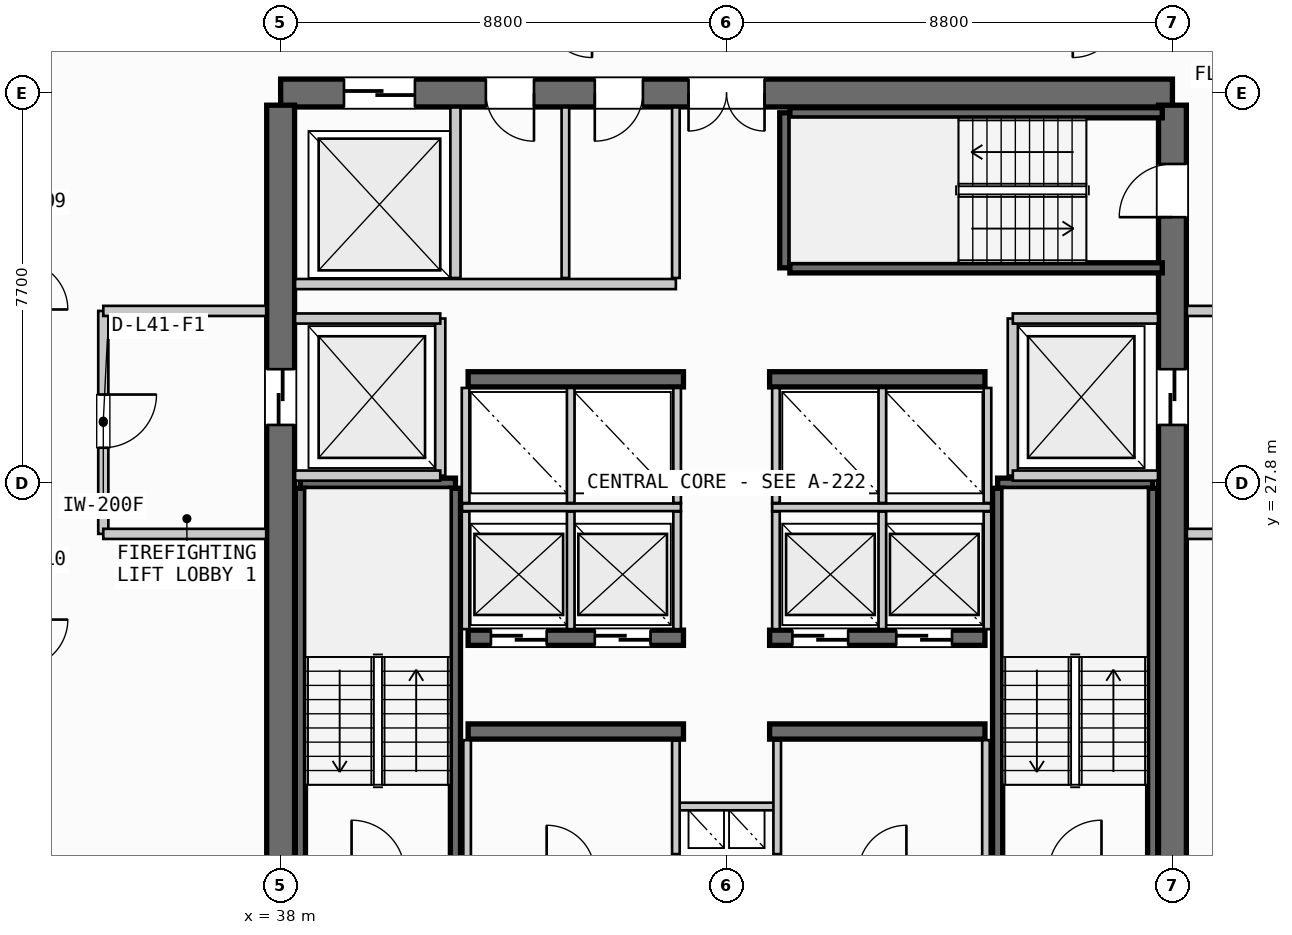
"""IFC4 building model, lengths in metres.
Left out: names, types, materials, properties, quantities, classifications, styles, units other than length and angle.
Written with IfcOpenShell. Run it as: python <this file> out.ifc"""

import sys

from ifc_helpers import new_model, si_unit, direction, frame, frame_2d, origin, place, context, subcontext, project, spatial, rectangle, extrude, source, transform, mapped, element, fill, save


model = new_model("IFC4")
c1 = context("Model", 3, precision=1e-05, world=origin(), true_north=direction((0.0, 1.0)))
c2 = subcontext(c1, "Body", "Model", "MODEL_VIEW")
j1 = project(units=[si_unit("LENGTHUNIT", "METRE"), si_unit("PLANEANGLEUNIT", "RADIAN")], contexts=[c1])
p1 = place(None, origin())
s1 = spatial("IfcSite", under=j1, at=p1, CompositionType="ELEMENT")
p2 = place(p1, origin())
s2 = spatial("IfcBuilding", under=s1, at=p2, CompositionType="ELEMENT")
p3 = place(p2, frame((0.0, 0.0, 160.75)))
s3 = spatial("IfcBuildingStorey", under=s2, at=p3, CompositionType="ELEMENT", Elevation=160.75)
p4 = place(p3, frame((55.6, 35.5, 0.0), z_axis=(0.0, 0.0, 1.0), x_axis=(-1.0, 0.0, 0.0)))
e1 = element("IfcWall", 1, at=p4, inside=s3, PredefinedType="SHEAR", context=c2, shape_type="SweptSolid", body=[
    extrude(rectangle(XDim=17.6, YDim=0.55, at=frame_2d((8.8, 0.0))), origin(), (0.0, 0.0, 1.0), 3.3),
])
p5 = place(p4, frame((8.05, 0.0, 0.0)))
e2 = element("IfcOpeningElement", 2, at=p5, cuts=e1, PredefinedType="OPENING", context=c2, shape_type="SweptSolid", body=[
    extrude(rectangle(XDim=1.5, YDim=2.2, at=frame_2d((0.75, 1.1))), frame((0.0, 0.285, 0.0), z_axis=(0.0, -1.0, 0.0), x_axis=(1.0, 0.0, 0.0)), (0.0, 0.0, 1.0), 0.57),
])
p6 = place(p4, frame((14.95, 0.0, 0.0)))
e3 = element("IfcOpeningElement", 3, at=p6, cuts=e1, PredefinedType="OPENING", context=c2, shape_type="SweptSolid", body=[
    extrude(rectangle(XDim=1.4, YDim=2.3, at=frame_2d((0.7, 1.15))), frame((0.0, 0.285, 0.0), z_axis=(0.0, -1.0, 0.0), x_axis=(1.0, 0.0, 0.0)), (0.0, 0.0, 1.0), 0.57),
])
p7 = place(p4, frame((12.6, 0.0, 0.0)))
e4 = element("IfcOpeningElement", 4, at=p7, cuts=e1, PredefinedType="OPENING", context=c2, shape_type="SweptSolid", body=[
    extrude(rectangle(XDim=0.95, YDim=2.15, at=frame_2d((0.475, 1.075))), frame((0.0, 0.285, 0.0), z_axis=(0.0, -1.0, 0.0), x_axis=(1.0, 0.0, 0.0)), (0.0, 0.0, 1.0), 0.57),
])
p8 = place(p4, frame((10.45, 0.0, 0.0)))
e5 = element("IfcOpeningElement", 5, at=p8, cuts=e1, PredefinedType="OPENING", context=c2, shape_type="SweptSolid", body=[
    extrude(rectangle(XDim=0.95, YDim=2.15, at=frame_2d((0.475, 1.075))), frame((0.0, 0.285, 0.0), z_axis=(0.0, -1.0, 0.0), x_axis=(1.0, 0.0, 0.0)), (0.0, 0.0, 1.0), 0.57),
])
p9 = place(p3, frame((38.0, 35.26, 0.0), z_axis=(0.0, 0.0, 1.0), x_axis=(0.0, -1.0, 0.0)))
e6 = element("IfcWall", 6, at=p9, inside=s3, PredefinedType="SHEAR", context=c2, shape_type="SweptSolid", body=[
    extrude(rectangle(XDim=14.92, YDim=0.55, at=frame_2d((7.46, 0.0))), origin(), (0.0, 0.0, 1.0), 3.3),
])
p10 = place(p9, frame((5.21, 0.0, 0.0)))
e7 = element("IfcOpeningElement", 7, at=p10, cuts=e6, PredefinedType="OPENING", context=c2, shape_type="SweptSolid", body=[
    extrude(rectangle(XDim=1.1, YDim=2.2, at=frame_2d((0.55, 1.1))), frame((0.0, 0.285, 0.0), z_axis=(0.0, -1.0, 0.0), x_axis=(1.0, 0.0, 0.0)), (0.0, 0.0, 1.0), 0.57),
])
p11 = place(p3, frame((55.6, 20.34, 0.0), z_axis=(0.0, 0.0, 1.0), x_axis=(0.0, 1.0, 0.0)))
e8 = element("IfcWall", 8, at=p11, inside=s3, PredefinedType="SHEAR", context=c2, shape_type="SweptSolid", body=[
    extrude(rectangle(XDim=14.92, YDim=0.55, at=frame_2d((7.46, 0.0))), origin(), (0.0, 0.0, 1.0), 3.3),
])
p12 = place(p11, frame((12.71, 0.0, 0.0)))
e9 = element("IfcOpeningElement", 9, at=p12, cuts=e8, PredefinedType="OPENING", context=c2, shape_type="SweptSolid", body=[
    extrude(rectangle(XDim=1.05, YDim=2.15, at=frame_2d((0.525, 1.075))), frame((0.0, 0.285, 0.0), z_axis=(0.0, -1.0, 0.0), x_axis=(1.0, 0.0, 0.0)), (0.0, 0.0, 1.0), 0.57),
])
p13 = place(p11, frame((8.61, 0.0, 0.0)))
e10 = element("IfcOpeningElement", 10, at=p13, cuts=e8, PredefinedType="OPENING", context=c2, shape_type="SweptSolid", body=[
    extrude(rectangle(XDim=1.1, YDim=2.2, at=frame_2d((0.55, 1.1))), frame((0.0, 0.285, 0.0), z_axis=(0.0, -1.0, 0.0), x_axis=(1.0, 0.0, 0.0)), (0.0, 0.0, 1.0), 0.57),
])
for number, where, z_axis, x_axis in (
    (11, (41.7, 22.9, 0.0), (0.0, 0.0, 1.0), (1.0, 0.0, 0.0)),
    (12, (47.65, 22.9, 0.0), (0.0, 0.0, 1.0), (1.0, 0.0, 0.0)),
):
    element("IfcWall", number, at=place(p3, frame(where, z_axis=z_axis, x_axis=x_axis)), inside=s3, PredefinedType="SHEAR", context=c2, shape_type="SweptSolid", body=[
        extrude(rectangle(XDim=4.25, YDim=0.3, at=frame_2d((2.125, 0.0))), origin(), (0.0, 0.0, 1.0), 3.3),
    ])
p14 = place(p3, frame((41.7, 24.75, 0.0), z_axis=(0.0, 0.0, 1.0), x_axis=(1.0, 0.0, 0.0)))
e13 = element("IfcWall", 13, at=p14, inside=s3, PredefinedType="SHEAR", context=c2, shape_type="SweptSolid", body=[
    extrude(rectangle(XDim=4.25, YDim=0.3, at=frame_2d((2.125, 0.0))), origin(), (0.0, 0.0, 1.0), 3.3),
])
p15 = place(p14, frame((0.45, 0.0, 0.0)))
e14 = element("IfcOpeningElement", 14, at=p15, cuts=e13, PredefinedType="OPENING", context=c2, shape_type="SweptSolid", body=[
    extrude(rectangle(XDim=1.1, YDim=2.2, at=frame_2d((0.55, 1.1))), frame((0.0, 0.16, 0.0), z_axis=(0.0, -1.0, 0.0), x_axis=(1.0, 0.0, 0.0)), (0.0, 0.0, 1.0), 0.32),
])
p16 = place(p14, frame((2.5, 0.0, 0.0)))
e15 = element("IfcOpeningElement", 15, at=p16, cuts=e13, PredefinedType="OPENING", context=c2, shape_type="SweptSolid", body=[
    extrude(rectangle(XDim=1.1, YDim=2.2, at=frame_2d((0.55, 1.1))), frame((0.0, 0.16, 0.0), z_axis=(0.0, -1.0, 0.0), x_axis=(1.0, 0.0, 0.0)), (0.0, 0.0, 1.0), 0.32),
])
p17 = place(p3, frame((47.65, 24.75, 0.0), z_axis=(0.0, 0.0, 1.0), x_axis=(1.0, 0.0, 0.0)))
e16 = element("IfcWall", 16, at=p17, inside=s3, PredefinedType="SHEAR", context=c2, shape_type="SweptSolid", body=[
    extrude(rectangle(XDim=4.25, YDim=0.3, at=frame_2d((2.125, 0.0))), origin(), (0.0, 0.0, 1.0), 3.3),
])
p18 = place(p17, frame((0.45, 0.0, 0.0)))
e17 = element("IfcOpeningElement", 17, at=p18, cuts=e16, PredefinedType="OPENING", context=c2, shape_type="SweptSolid", body=[
    extrude(rectangle(XDim=1.1, YDim=2.2, at=frame_2d((0.55, 1.1))), frame((0.0, 0.16, 0.0), z_axis=(0.0, -1.0, 0.0), x_axis=(1.0, 0.0, 0.0)), (0.0, 0.0, 1.0), 0.32),
])
p19 = place(p17, frame((2.5, 0.0, 0.0)))
e18 = element("IfcOpeningElement", 18, at=p19, cuts=e16, PredefinedType="OPENING", context=c2, shape_type="SweptSolid", body=[
    extrude(rectangle(XDim=1.1, YDim=2.2, at=frame_2d((0.55, 1.1))), frame((0.0, 0.16, 0.0), z_axis=(0.0, -1.0, 0.0), x_axis=(1.0, 0.0, 0.0)), (0.0, 0.0, 1.0), 0.32),
])
for number, where, z_axis, x_axis in (
    (19, (41.7, 29.85, 0.0), (0.0, 0.0, 1.0), (1.0, 0.0, 0.0)),
    (20, (47.65, 29.85, 0.0), (0.0, 0.0, 1.0), (1.0, 0.0, 0.0)),
):
    element("IfcWall", number, at=place(p3, frame(where, z_axis=z_axis, x_axis=x_axis)), inside=s3, PredefinedType="SHEAR", context=c2, shape_type="SweptSolid", body=[
        extrude(rectangle(XDim=4.25, YDim=0.3, at=frame_2d((2.125, 0.0))), origin(), (0.0, 0.0, 1.0), 3.3),
    ])
p20 = place(p3, frame((38.39, 27.8, 0.0), z_axis=(0.0, 0.0, 1.0), x_axis=(1.0, 0.0, 0.0)))
e21 = element("IfcWall", 21, at=p20, inside=s3, PredefinedType="SHEAR", context=c2, shape_type="SweptSolid", body=[
    extrude(rectangle(XDim=3.06, YDim=0.2, at=frame_2d((1.53, 0.0))), origin(), (0.0, 0.0, 1.0), 3.3),
])
for number, where, z_axis, x_axis in (
    (22, (41.45, 27.7, 0.0), (0.0, 0.0, 1.0), (0.0, -1.0, 0.0)),
    (23, (38.39, 20.35, 0.0), (0.0, 0.0, 1.0), (0.0, 1.0, 0.0)),
):
    element("IfcWall", number, at=place(p3, frame(where, z_axis=z_axis, x_axis=x_axis)), inside=s3, PredefinedType="SHEAR", context=c2, shape_type="SweptSolid", body=[
        extrude(rectangle(XDim=7.35, YDim=0.2, at=frame_2d((3.675, 0.0))), origin(), (0.0, 0.0, 1.0), 3.3),
    ])
p21 = place(p3, frame((52.15, 27.8, 0.0), z_axis=(0.0, 0.0, 1.0), x_axis=(1.0, 0.0, 0.0)))
e24 = element("IfcWall", 24, at=p21, inside=s3, PredefinedType="SHEAR", context=c2, shape_type="SweptSolid", body=[
    extrude(rectangle(XDim=3.06, YDim=0.2, at=frame_2d((1.53, 0.0))), origin(), (0.0, 0.0, 1.0), 3.3),
])
for number, where, z_axis, x_axis in (
    (25, (55.21, 27.7, 0.0), (0.0, 0.0, 1.0), (0.0, -1.0, 0.0)),
    (26, (52.15, 20.35, 0.0), (0.0, 0.0, 1.0), (0.0, 1.0, 0.0)),
):
    element("IfcWall", number, at=place(p3, frame(where, z_axis=z_axis, x_axis=x_axis)), inside=s3, PredefinedType="SHEAR", context=c2, shape_type="SweptSolid", body=[
        extrude(rectangle(XDim=7.35, YDim=0.2, at=frame_2d((3.675, 0.0))), origin(), (0.0, 0.0, 1.0), 3.3),
    ])
p22 = place(p3, frame((47.95, 32.05, 0.0), z_axis=(0.0, 0.0, 1.0), x_axis=(0.0, 1.0, 0.0)))
e27 = element("IfcWall", 27, at=p22, inside=s3, PredefinedType="SHEAR", context=c2, shape_type="SweptSolid", body=[
    extrude(rectangle(XDim=3.06, YDim=0.2, at=frame_2d((1.53, 0.0))), origin(), (0.0, 0.0, 1.0), 3.3),
])
for number, where, z_axis, x_axis in (
    (28, (48.05, 35.11, 0.0), (0.0, 0.0, 1.0), (1.0, 0.0, 0.0)),
    (29, (55.4, 32.05, 0.0), (0.0, 0.0, 1.0), (-1.0, 0.0, 0.0)),
):
    element("IfcWall", number, at=place(p3, frame(where, z_axis=z_axis, x_axis=x_axis)), inside=s3, PredefinedType="SHEAR", context=c2, shape_type="SweptSolid", body=[
        extrude(rectangle(XDim=7.35, YDim=0.2, at=frame_2d((3.675, 0.0))), origin(), (0.0, 0.0, 1.0), 3.3),
    ])
p23 = place(p3, frame((45.8, 21.42, 0.0), z_axis=(0.0, 0.0, 1.0), x_axis=(1.0, 0.0, 0.0)))
e30 = element("IfcWall", 30, at=p23, inside=s3, PredefinedType="PARTITIONING", context=c2, shape_type="SweptSolid", body=[
    extrude(rectangle(XDim=2.0, YDim=0.15, at=frame_2d((1.0, 0.0))), origin(), (0.0, 0.0, 1.0), 2.28),
])
for number, where, z_axis, x_axis in (
    (31, (45.8, 20.48, 0.0), (0.0, 0.0, 1.0), (0.0, 1.0, 0.0)),
    (32, (47.8, 20.48, 0.0), (0.0, 0.0, 1.0), (0.0, 1.0, 0.0)),
):
    element("IfcWall", number, at=place(p3, frame(where, z_axis=z_axis, x_axis=x_axis)), inside=s3, PredefinedType="PARTITIONING", context=c2, shape_type="SweptSolid", body=[
        extrude(rectangle(XDim=2.24, YDim=0.15, at=frame_2d((1.12, 0.0))), origin(), (0.0, 0.0, 1.0), 2.28),
    ])
p24 = place(p3, frame((41.15, 27.95, 0.0), z_axis=(0.0, 0.0, 1.0), x_axis=(0.0, 1.0, 0.0)))
e33 = element("IfcWall", 33, at=p24, inside=s3, PredefinedType="PARTITIONING", context=c2, shape_type="SweptSolid", body=[
    extrude(rectangle(XDim=3.1, YDim=0.2, at=frame_2d((1.55, 0.0))), origin(), (0.0, 0.0, 1.0), 2.28),
])
for number, where, z_axis, x_axis in (
    (34, (38.285, 27.95, 0.0), (0.0, 0.0, 1.0), (1.0, 0.0, 0.0)),
    (35, (38.285, 31.05, 0.0), (0.0, 0.0, 1.0), (1.0, 0.0, 0.0)),
):
    element("IfcWall", number, at=place(p3, frame(where, z_axis=z_axis, x_axis=x_axis)), inside=s3, PredefinedType="PARTITIONING", context=c2, shape_type="SweptSolid", body=[
        extrude(rectangle(XDim=2.865, YDim=0.2, at=frame_2d((1.433, 0.0))), origin(), (0.0, 0.0, 1.0), 2.28),
    ])
p25 = place(p3, frame((34.5, 31.2, 0.0), z_axis=(0.0, 0.0, 1.0), x_axis=(0.0, -1.0, 0.0)))
e36 = element("IfcWall", 36, at=p25, inside=s3, PredefinedType="PARTITIONING", context=c2, shape_type="SweptSolid", body=[
    extrude(rectangle(XDim=4.4, YDim=0.2, at=frame_2d((2.2, 0.0))), origin(), (0.0, 0.0, 1.0), 2.28),
])
p26 = place(p25, frame((1.65, 0.0, 0.0)))
e37 = element("IfcOpeningElement", 37, at=p26, cuts=e36, PredefinedType="OPENING", context=c2, shape_type="SweptSolid", body=[
    extrude(rectangle(XDim=1.05, YDim=2.15, at=frame_2d((0.525, 1.075))), frame((0.0, 0.11, 0.0), z_axis=(0.0, -1.0, 0.0), x_axis=(1.0, 0.0, 0.0)), (0.0, 0.0, 1.0), 0.22),
])
for number, where, z_axis, x_axis in (
    (38, (34.5, 26.8, 0.0), (0.0, 0.0, 1.0), (1.0, 0.0, 0.0)),
    (39, (34.5, 31.2, 0.0), (0.0, 0.0, 1.0), (1.0, 0.0, 0.0)),
):
    element("IfcWall", number, at=place(p3, frame(where, z_axis=z_axis, x_axis=x_axis)), inside=s3, PredefinedType="PARTITIONING", context=c2, shape_type="SweptSolid", body=[
        extrude(rectangle(XDim=3.215, YDim=0.2, at=frame_2d((1.607, 0.0))), origin(), (0.0, 0.0, 1.0), 2.28),
    ])
p27 = place(p3, frame((52.45, 27.95, 0.0), z_axis=(0.0, 0.0, 1.0), x_axis=(0.0, 1.0, 0.0)))
e40 = element("IfcWall", 40, at=p27, inside=s3, PredefinedType="PARTITIONING", context=c2, shape_type="SweptSolid", body=[
    extrude(rectangle(XDim=3.1, YDim=0.2, at=frame_2d((1.55, 0.0))), origin(), (0.0, 0.0, 1.0), 2.28),
])
for number, where, z_axis, x_axis in (
    (41, (52.45, 27.95, 0.0), (0.0, 0.0, 1.0), (1.0, 0.0, 0.0)),
    (42, (52.45, 31.05, 0.0), (0.0, 0.0, 1.0), (1.0, 0.0, 0.0)),
):
    element("IfcWall", number, at=place(p3, frame(where, z_axis=z_axis, x_axis=x_axis)), inside=s3, PredefinedType="PARTITIONING", context=c2, shape_type="SweptSolid", body=[
        extrude(rectangle(XDim=2.865, YDim=0.2, at=frame_2d((1.433, 0.0))), origin(), (0.0, 0.0, 1.0), 2.28),
    ])
for number, where, z_axis, x_axis in (
    (43, (55.885, 26.8, 0.0), (0.0, 0.0, 1.0), (1.0, 0.0, 0.0)),
    (44, (55.885, 31.2, 0.0), (0.0, 0.0, 1.0), (1.0, 0.0, 0.0)),
):
    element("IfcWall", number, at=place(p3, frame(where, z_axis=z_axis, x_axis=x_axis)), inside=s3, PredefinedType="PARTITIONING", context=c2, shape_type="SweptSolid", body=[
        extrude(rectangle(XDim=3.215, YDim=0.2, at=frame_2d((1.607, 0.0))), origin(), (0.0, 0.0, 1.0), 2.28),
    ])
for number, where, z_axis, x_axis in (
    (45, (41.68, 20.385, 0.0), (0.0, 0.0, 1.0), (0.0, 1.0, 0.0)),
    (46, (51.92, 20.385, 0.0), (0.0, 0.0, 1.0), (0.0, 1.0, 0.0)),
):
    element("IfcWall", number, at=place(p3, frame(where, z_axis=z_axis, x_axis=x_axis)), inside=s3, PredefinedType="PARTITIONING", context=c2, shape_type="SweptSolid", body=[
        extrude(rectangle(XDim=2.345, YDim=0.15, at=frame_2d((1.172, 0.0))), origin(), (0.0, 0.0, 1.0), 2.28),
    ])
p28 = place(p3, frame((41.58, 27.325, 0.0), z_axis=(0.0, 0.0, 1.0), x_axis=(1.0, 0.0, 0.0)))
e47 = element("IfcWall", 47, at=p28, inside=s3, PredefinedType="PARTITIONING", context=c2, shape_type="SweptSolid", body=[
    extrude(rectangle(XDim=4.32, YDim=0.15, at=frame_2d((2.16, 0.0))), origin(), (0.0, 0.0, 1.0), 2.28),
])
p29 = place(p3, frame((47.7, 27.325, 0.0), z_axis=(0.0, 0.0, 1.0), x_axis=(1.0, 0.0, 0.0)))
e48 = element("IfcWall", 48, at=p29, inside=s3, PredefinedType="PARTITIONING", context=c2, shape_type="SweptSolid", body=[
    extrude(rectangle(XDim=4.32, YDim=0.15, at=frame_2d((2.16, 0.0))), origin(), (0.0, 0.0, 1.0), 2.28),
])
for number, where, z_axis, x_axis in (
    (49, (41.65, 24.92, 0.0), (0.0, 0.0, 1.0), (0.0, 1.0, 0.0)),
    (50, (43.725, 24.92, 0.0), (0.0, 0.0, 1.0), (0.0, 1.0, 0.0)),
    (51, (45.825, 24.92, 0.0), (0.0, 0.0, 1.0), (0.0, 1.0, 0.0)),
    (52, (47.775, 24.92, 0.0), (0.0, 0.0, 1.0), (0.0, 1.0, 0.0)),
    (53, (49.875, 24.92, 0.0), (0.0, 0.0, 1.0), (0.0, 1.0, 0.0)),
    (54, (51.95, 24.92, 0.0), (0.0, 0.0, 1.0), (0.0, 1.0, 0.0)),
):
    element("IfcWall", number, at=place(p3, frame(where, z_axis=z_axis, x_axis=x_axis)), inside=s3, PredefinedType="PARTITIONING", context=c2, shape_type="SweptSolid", body=[
        extrude(rectangle(XDim=2.32, YDim=0.15, at=frame_2d((1.16, 0.0))), origin(), (0.0, 0.0, 1.0), 2.28),
    ])
for number, where, z_axis, x_axis in (
    (55, (41.65, 27.41, 0.0), (0.0, 0.0, 1.0), (0.0, 1.0, 0.0)),
    (56, (43.725, 27.41, 0.0), (0.0, 0.0, 1.0), (0.0, 1.0, 0.0)),
    (57, (45.825, 27.41, 0.0), (0.0, 0.0, 1.0), (0.0, 1.0, 0.0)),
    (58, (47.775, 27.41, 0.0), (0.0, 0.0, 1.0), (0.0, 1.0, 0.0)),
    (59, (49.875, 27.41, 0.0), (0.0, 0.0, 1.0), (0.0, 1.0, 0.0)),
    (60, (51.95, 27.41, 0.0), (0.0, 0.0, 1.0), (0.0, 1.0, 0.0)),
):
    element("IfcWall", number, at=place(p3, frame(where, z_axis=z_axis, x_axis=x_axis)), inside=s3, PredefinedType="PARTITIONING", context=c2, shape_type="SweptSolid", body=[
        extrude(rectangle(XDim=2.27, YDim=0.15, at=frame_2d((1.135, 0.0))), origin(), (0.0, 0.0, 1.0), 2.28),
    ])
p30 = place(p3, frame((41.45, 31.85, 0.0), z_axis=(0.0, 0.0, 1.0), x_axis=(0.0, 1.0, 0.0)))
e61 = element("IfcWall", 61, at=p30, inside=s3, PredefinedType="PARTITIONING", context=c2, shape_type="SweptSolid", body=[
    extrude(rectangle(XDim=3.365, YDim=0.2, at=frame_2d((1.683, 0.0))), origin(), (0.0, 0.0, 1.0), 2.28),
])
p31 = place(p3, frame((38.285, 31.73, 0.0), z_axis=(0.0, 0.0, 1.0), x_axis=(1.0, 0.0, 0.0)))
e62 = element("IfcWall", 62, at=p31, inside=s3, PredefinedType="PARTITIONING", context=c2, shape_type="SweptSolid", body=[
    extrude(rectangle(XDim=7.515, YDim=0.2, at=frame_2d((3.758, 0.0))), origin(), (0.0, 0.0, 1.0), 2.28),
])
p32 = place(p3, frame((45.8, 31.85, 0.0), z_axis=(0.0, 0.0, 1.0), x_axis=(0.0, 1.0, 0.0)))
e63 = element("IfcWall", 63, at=p32, inside=s3, PredefinedType="PARTITIONING", context=c2, shape_type="SweptSolid", body=[
    extrude(rectangle(XDim=3.365, YDim=0.15, at=frame_2d((1.683, 0.0))), origin(), (0.0, 0.0, 1.0), 2.28),
])
p33 = place(p3, frame((43.62, 31.85, 0.0), z_axis=(0.0, 0.0, 1.0), x_axis=(0.0, 1.0, 0.0)))
e64 = element("IfcWall", 64, at=p33, inside=s3, PredefinedType="PLUMBINGWALL", context=c2, shape_type="SweptSolid", body=[
    extrude(rectangle(XDim=3.365, YDim=0.15, at=frame_2d((1.683, 0.0))), origin(), (0.0, 0.0, 1.0), 2.28),
])
m1 = source(origin(), c2, "Body", "SweptSolid", [
    extrude(rectangle(XDim=1.05, YDim=2.15, at=frame_2d((0.525, 1.075))), frame((0.0, 0.025, 0.0), z_axis=(0.0, -1.0, 0.0), x_axis=(1.0, 0.0, 0.0)), (0.0, 0.0, 1.0), 0.05),
])
p34 = place(p12, origin())
e65 = element("IfcDoor", 65, at=p34, inside=s3, OperationType="SINGLE_SWING_LEFT", PredefinedType="DOOR", context=c2, shape_type="MappedRepresentation", body=[
    mapped(m1, transform((0.0, 0.0, 0.0), scale=1.0)),
])
fill(e9, e65)
m2 = source(origin(), c2, "Body", "SweptSolid", [
    extrude(rectangle(XDim=1.5, YDim=2.2, at=frame_2d((0.75, 1.1))), frame((0.0, 0.025, 0.0), z_axis=(0.0, -1.0, 0.0), x_axis=(1.0, 0.0, 0.0)), (0.0, 0.0, 1.0), 0.05),
])
p35 = place(p5, origin())
e66 = element("IfcDoor", 66, at=p35, inside=s3, OperationType="DOUBLE_DOOR_SINGLE_SWING", PredefinedType="DOOR", context=c2, shape_type="MappedRepresentation", body=[
    mapped(m2, transform((0.0, 0.0, 0.0), scale=1.0)),
])
fill(e2, e66)
m3 = source(origin(), c2, "Body", "SweptSolid", [
    extrude(rectangle(XDim=1.1, YDim=2.2, at=frame_2d((0.55, 1.1))), frame((0.0, 0.025, 0.0), z_axis=(0.0, -1.0, 0.0), x_axis=(1.0, 0.0, 0.0)), (0.0, 0.0, 1.0), 0.05),
])
p36 = place(p10, origin())
e67 = element("IfcDoor", 67, at=p36, inside=s3, OperationType="SLIDING_TO_LEFT", PredefinedType="DOOR", context=c2, shape_type="MappedRepresentation", body=[
    mapped(m3, transform((0.0, 0.0, 0.0), scale=1.0)),
])
fill(e7, e67)
p37 = place(p13, origin())
e68 = element("IfcDoor", 68, at=p37, inside=s3, OperationType="SLIDING_TO_RIGHT", PredefinedType="DOOR", context=c2, shape_type="MappedRepresentation", body=[
    mapped(m3, transform((0.0, 0.0, 0.0), scale=1.0)),
])
fill(e10, e68)
p38 = place(p15, origin())
e69 = element("IfcDoor", 69, at=p38, inside=s3, OperationType="SLIDING_TO_RIGHT", PredefinedType="DOOR", context=c2, shape_type="MappedRepresentation", body=[
    mapped(m3, transform((0.0, 0.0, 0.0), scale=1.0)),
])
fill(e14, e69)
p39 = place(p16, origin())
e70 = element("IfcDoor", 70, at=p39, inside=s3, OperationType="SLIDING_TO_RIGHT", PredefinedType="DOOR", context=c2, shape_type="MappedRepresentation", body=[
    mapped(m3, transform((0.0, 0.0, 0.0), scale=1.0)),
])
fill(e15, e70)
p40 = place(p18, origin())
e71 = element("IfcDoor", 71, at=p40, inside=s3, OperationType="SLIDING_TO_RIGHT", PredefinedType="DOOR", context=c2, shape_type="MappedRepresentation", body=[
    mapped(m3, transform((0.0, 0.0, 0.0), scale=1.0)),
])
fill(e17, e71)
p41 = place(p19, origin())
e72 = element("IfcDoor", 72, at=p41, inside=s3, OperationType="SLIDING_TO_RIGHT", PredefinedType="DOOR", context=c2, shape_type="MappedRepresentation", body=[
    mapped(m3, transform((0.0, 0.0, 0.0), scale=1.0)),
])
fill(e18, e72)
m4 = source(origin(), c2, "Body", "SweptSolid", [
    extrude(rectangle(XDim=1.4, YDim=2.3, at=frame_2d((0.7, 1.15))), frame((0.0, 0.025, 0.0), z_axis=(0.0, -1.0, 0.0), x_axis=(1.0, 0.0, 0.0)), (0.0, 0.0, 1.0), 0.05),
])
p42 = place(p6, origin())
e73 = element("IfcDoor", 73, at=p42, inside=s3, OperationType="SLIDING_TO_RIGHT", PredefinedType="DOOR", context=c2, shape_type="MappedRepresentation", body=[
    mapped(m4, transform((0.0, 0.0, 0.0), scale=1.0)),
])
fill(e3, e73)
m5 = source(origin(), c2, "Body", "SweptSolid", [
    extrude(rectangle(XDim=0.95, YDim=2.15, at=frame_2d((0.475, 1.075))), frame((0.0, 0.025, 0.0), z_axis=(0.0, -1.0, 0.0), x_axis=(1.0, 0.0, 0.0)), (0.0, 0.0, 1.0), 0.05),
])
p43 = place(p7, origin())
e74 = element("IfcDoor", 74, at=p43, inside=s3, OperationType="SINGLE_SWING_LEFT", PredefinedType="DOOR", context=c2, shape_type="MappedRepresentation", body=[
    mapped(m5, transform((0.0, 0.0, 0.0), scale=1.0)),
])
fill(e4, e74)
p44 = place(p8, origin())
e75 = element("IfcDoor", 75, at=p44, inside=s3, OperationType="SINGLE_SWING_RIGHT", PredefinedType="DOOR", context=c2, shape_type="MappedRepresentation", body=[
    mapped(m5, transform((0.0, 0.0, 0.0), scale=1.0)),
])
fill(e5, e75)
p45 = place(p26, origin())
e76 = element("IfcDoor", 76, at=p45, inside=s3, OperationType="SINGLE_SWING_LEFT", PredefinedType="DOOR", context=c2, shape_type="MappedRepresentation", body=[
    mapped(m1, transform((0.0, 0.0, 0.0), scale=1.0)),
])
fill(e37, e76)
save(model, sys.argv[1])
